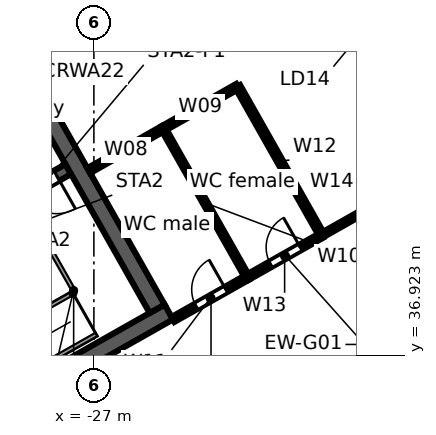
"""IFC4 building model, lengths in metres.
Left out: names, types, materials, properties, quantities, classifications, styles, units other than length and angle.
Written with IfcOpenShell. Run it as: python <this file> out.ifc"""

import sys

from ifc_helpers import new_model, si_unit, direction, frame, frame_2d, origin, place, context, subcontext, project, spatial, rectangle, extrude, element, fill, save


model = new_model("IFC4")
c1 = context("Model", 3, precision=1e-05, world=origin(), true_north=direction((0.0, 1.0)))
c2 = subcontext(c1, "Body", "Model", "MODEL_VIEW")
j1 = project(units=[si_unit("LENGTHUNIT", "METRE"), si_unit("PLANEANGLEUNIT", "RADIAN")], contexts=[c1])
p1 = place(None, origin())
s1 = spatial("IfcSite", under=j1, at=p1, CompositionType="ELEMENT")
p2 = place(p1, origin())
s2 = spatial("IfcBuilding", under=s1, at=p2, CompositionType="ELEMENT")
p3 = place(p2, frame((0.0, 0.0, 238.7)))
s3 = spatial("IfcBuildingStorey", under=s2, at=p3, CompositionType="ELEMENT", Elevation=238.7)
p4 = place(p3, frame((-0.046, 47.974, 0.0), z_axis=(0.0, 0.0, 1.0), x_axis=(-0.870356579543, -0.492421998337, 0.0)))
e1 = element("IfcWall", 1, at=p4, inside=s3, PredefinedType="STANDARD", context=c2, shape_type="SweptSolid", body=[
    extrude(rectangle(XDim=43.754, YDim=0.25, at=frame_2d((21.877, 0.0))), origin(), (0.0, 0.0, 1.0), 3.62),
])
p5 = place(p4, frame((41.061, 0.0, 0.8)))
e2 = element("IfcOpeningElement", 2, at=p5, cuts=e1, PredefinedType="OPENING", context=c2, shape_type="SweptSolid", body=[
    extrude(rectangle(XDim=2.4, YDim=2.2, at=frame_2d((1.2, 1.1))), frame((0.0, 0.135, 0.0), z_axis=(0.0, -1.0, 0.0), x_axis=(1.0, 0.0, 0.0)), (0.0, 0.0, 1.0), 0.27),
])
p6 = place(p4, frame((38.443, 0.0, 0.0)))
e3 = element("IfcOpeningElement", 3, at=p6, cuts=e1, PredefinedType="OPENING", context=c2, shape_type="SweptSolid", body=[
    extrude(rectangle(XDim=1.8, YDim=2.4, at=frame_2d((0.9, 1.2))), frame((0.0, 0.135, 0.0), z_axis=(0.0, -1.0, 0.0), x_axis=(1.0, 0.0, 0.0)), (0.0, 0.0, 1.0), 0.27),
])
p7 = place(p4, frame((35.225, 0.0, 0.8)))
e4 = element("IfcOpeningElement", 4, at=p7, cuts=e1, PredefinedType="OPENING", context=c2, shape_type="SweptSolid", body=[
    extrude(rectangle(XDim=2.4, YDim=2.2, at=frame_2d((1.2, 1.1))), frame((0.0, 0.135, 0.0), z_axis=(0.0, -1.0, 0.0), x_axis=(1.0, 0.0, 0.0)), (0.0, 0.0, 1.0), 0.27),
])
p8 = place(p4, frame((32.307, 0.0, 0.8)))
e5 = element("IfcOpeningElement", 5, at=p8, cuts=e1, PredefinedType="OPENING", context=c2, shape_type="SweptSolid", body=[
    extrude(rectangle(XDim=2.4, YDim=2.2, at=frame_2d((1.2, 1.1))), frame((0.0, 0.135, 0.0), z_axis=(0.0, -1.0, 0.0), x_axis=(1.0, 0.0, 0.0)), (0.0, 0.0, 1.0), 0.27),
])
p9 = place(p4, frame((29.688, 0.0, 0.0)))
e6 = element("IfcOpeningElement", 6, at=p9, cuts=e1, PredefinedType="OPENING", context=c2, shape_type="SweptSolid", body=[
    extrude(rectangle(XDim=1.8, YDim=2.4, at=frame_2d((0.9, 1.2))), frame((0.0, 0.135, 0.0), z_axis=(0.0, -1.0, 0.0), x_axis=(1.0, 0.0, 0.0)), (0.0, 0.0, 1.0), 0.27),
])
p10 = place(p4, frame((26.47, 0.0, 0.8)))
e7 = element("IfcOpeningElement", 7, at=p10, cuts=e1, PredefinedType="OPENING", context=c2, shape_type="SweptSolid", body=[
    extrude(rectangle(XDim=2.4, YDim=2.2, at=frame_2d((1.2, 1.1))), frame((0.0, 0.135, 0.0), z_axis=(0.0, -1.0, 0.0), x_axis=(1.0, 0.0, 0.0)), (0.0, 0.0, 1.0), 0.27),
])
p11 = place(p4, frame((23.552, 0.0, 0.8)))
e8 = element("IfcOpeningElement", 8, at=p11, cuts=e1, PredefinedType="OPENING", context=c2, shape_type="SweptSolid", body=[
    extrude(rectangle(XDim=2.4, YDim=2.2, at=frame_2d((1.2, 1.1))), frame((0.0, 0.135, 0.0), z_axis=(0.0, -1.0, 0.0), x_axis=(1.0, 0.0, 0.0)), (0.0, 0.0, 1.0), 0.27),
])
p12 = place(p4, frame((20.934, 0.0, 0.0)))
e9 = element("IfcOpeningElement", 9, at=p12, cuts=e1, PredefinedType="OPENING", context=c2, shape_type="SweptSolid", body=[
    extrude(rectangle(XDim=1.8, YDim=2.4, at=frame_2d((0.9, 1.2))), frame((0.0, 0.135, 0.0), z_axis=(0.0, -1.0, 0.0), x_axis=(1.0, 0.0, 0.0)), (0.0, 0.0, 1.0), 0.27),
])
p13 = place(p4, frame((17.716, 0.0, 0.8)))
e10 = element("IfcOpeningElement", 10, at=p13, cuts=e1, PredefinedType="OPENING", context=c2, shape_type="SweptSolid", body=[
    extrude(rectangle(XDim=2.4, YDim=2.2, at=frame_2d((1.2, 1.1))), frame((0.0, 0.135, 0.0), z_axis=(0.0, -1.0, 0.0), x_axis=(1.0, 0.0, 0.0)), (0.0, 0.0, 1.0), 0.27),
])
p14 = place(p4, frame((14.798, 0.0, 0.8)))
e11 = element("IfcOpeningElement", 11, at=p14, cuts=e1, PredefinedType="OPENING", context=c2, shape_type="SweptSolid", body=[
    extrude(rectangle(XDim=2.4, YDim=2.2, at=frame_2d((1.2, 1.1))), frame((0.0, 0.135, 0.0), z_axis=(0.0, -1.0, 0.0), x_axis=(1.0, 0.0, 0.0)), (0.0, 0.0, 1.0), 0.27),
])
p15 = place(p4, frame((12.179, 0.0, 0.0)))
e12 = element("IfcOpeningElement", 12, at=p15, cuts=e1, PredefinedType="OPENING", context=c2, shape_type="SweptSolid", body=[
    extrude(rectangle(XDim=1.8, YDim=2.4, at=frame_2d((0.9, 1.2))), frame((0.0, 0.135, 0.0), z_axis=(0.0, -1.0, 0.0), x_axis=(1.0, 0.0, 0.0)), (0.0, 0.0, 1.0), 0.27),
])
p16 = place(p4, frame((8.961, 0.0, 0.8)))
e13 = element("IfcOpeningElement", 13, at=p16, cuts=e1, PredefinedType="OPENING", context=c2, shape_type="SweptSolid", body=[
    extrude(rectangle(XDim=2.4, YDim=2.2, at=frame_2d((1.2, 1.1))), frame((0.0, 0.135, 0.0), z_axis=(0.0, -1.0, 0.0), x_axis=(1.0, 0.0, 0.0)), (0.0, 0.0, 1.0), 0.27),
])
p17 = place(p4, frame((6.043, 0.0, 0.8)))
e14 = element("IfcOpeningElement", 14, at=p17, cuts=e1, PredefinedType="OPENING", context=c2, shape_type="SweptSolid", body=[
    extrude(rectangle(XDim=2.4, YDim=2.2, at=frame_2d((1.2, 1.1))), frame((0.0, 0.135, 0.0), z_axis=(0.0, -1.0, 0.0), x_axis=(1.0, 0.0, 0.0)), (0.0, 0.0, 1.0), 0.27),
])
p18 = place(p4, frame((3.425, 0.0, 0.0)))
e15 = element("IfcOpeningElement", 15, at=p18, cuts=e1, PredefinedType="OPENING", context=c2, shape_type="SweptSolid", body=[
    extrude(rectangle(XDim=1.8, YDim=2.4, at=frame_2d((0.9, 1.2))), frame((0.0, 0.135, 0.0), z_axis=(0.0, -1.0, 0.0), x_axis=(1.0, 0.0, 0.0)), (0.0, 0.0, 1.0), 0.27),
])
p19 = place(p4, frame((0.207, 0.0, 0.8)))
e16 = element("IfcOpeningElement", 16, at=p19, cuts=e1, PredefinedType="OPENING", context=c2, shape_type="SweptSolid", body=[
    extrude(rectangle(XDim=2.4, YDim=2.2, at=frame_2d((1.2, 1.1))), frame((0.0, 0.135, 0.0), z_axis=(0.0, -1.0, 0.0), x_axis=(1.0, 0.0, 0.0)), (0.0, 0.0, 1.0), 0.27),
])
p20 = place(p3, frame((-58.732, 38.771, 0.0), z_axis=(0.0, 0.0, 1.0), x_axis=(0.870354824205, 0.492425100887, 0.0)))
e17 = element("IfcWall", 17, at=p20, inside=s3, PredefinedType="STANDARD", context=c2, shape_type="SweptSolid", body=[
    extrude(rectangle(XDim=64.006, YDim=0.25, at=frame_2d((32.003, 0.0))), origin(), (0.0, 0.0, 1.0), 3.62),
])
p21 = place(p20, frame((61.259, 0.0, 0.8)))
e18 = element("IfcOpeningElement", 18, at=p21, cuts=e17, PredefinedType="OPENING", context=c2, shape_type="SweptSolid", body=[
    extrude(rectangle(XDim=2.4, YDim=2.2, at=frame_2d((1.2, 1.1))), frame((0.0, 0.135, 0.0), z_axis=(0.0, -1.0, 0.0), x_axis=(1.0, 0.0, 0.0)), (0.0, 0.0, 1.0), 0.27),
])
p22 = place(p20, frame((58.216, 0.0, 0.8)))
e19 = element("IfcOpeningElement", 19, at=p22, cuts=e17, PredefinedType="OPENING", context=c2, shape_type="SweptSolid", body=[
    extrude(rectangle(XDim=2.4, YDim=2.2, at=frame_2d((1.2, 1.1))), frame((0.0, 0.135, 0.0), z_axis=(0.0, -1.0, 0.0), x_axis=(1.0, 0.0, 0.0)), (0.0, 0.0, 1.0), 0.27),
])
p23 = place(p20, frame((55.173, 0.0, 0.8)))
e20 = element("IfcOpeningElement", 20, at=p23, cuts=e17, PredefinedType="OPENING", context=c2, shape_type="SweptSolid", body=[
    extrude(rectangle(XDim=2.4, YDim=2.2, at=frame_2d((1.2, 1.1))), frame((0.0, 0.135, 0.0), z_axis=(0.0, -1.0, 0.0), x_axis=(1.0, 0.0, 0.0)), (0.0, 0.0, 1.0), 0.27),
])
p24 = place(p20, frame((52.129, 0.0, 0.8)))
e21 = element("IfcOpeningElement", 21, at=p24, cuts=e17, PredefinedType="OPENING", context=c2, shape_type="SweptSolid", body=[
    extrude(rectangle(XDim=2.4, YDim=2.2, at=frame_2d((1.2, 1.1))), frame((0.0, 0.135, 0.0), z_axis=(0.0, -1.0, 0.0), x_axis=(1.0, 0.0, 0.0)), (0.0, 0.0, 1.0), 0.27),
])
p25 = place(p20, frame((49.086, 0.0, 0.8)))
e22 = element("IfcOpeningElement", 22, at=p25, cuts=e17, PredefinedType="OPENING", context=c2, shape_type="SweptSolid", body=[
    extrude(rectangle(XDim=2.4, YDim=2.2, at=frame_2d((1.2, 1.1))), frame((0.0, 0.135, 0.0), z_axis=(0.0, -1.0, 0.0), x_axis=(1.0, 0.0, 0.0)), (0.0, 0.0, 1.0), 0.27),
])
p26 = place(p20, frame((46.043, 0.0, 0.8)))
e23 = element("IfcOpeningElement", 23, at=p26, cuts=e17, PredefinedType="OPENING", context=c2, shape_type="SweptSolid", body=[
    extrude(rectangle(XDim=2.4, YDim=2.2, at=frame_2d((1.2, 1.1))), frame((0.0, 0.135, 0.0), z_axis=(0.0, -1.0, 0.0), x_axis=(1.0, 0.0, 0.0)), (0.0, 0.0, 1.0), 0.27),
])
p27 = place(p20, frame((43.0, 0.0, 0.8)))
e24 = element("IfcOpeningElement", 24, at=p27, cuts=e17, PredefinedType="OPENING", context=c2, shape_type="SweptSolid", body=[
    extrude(rectangle(XDim=2.4, YDim=2.2, at=frame_2d((1.2, 1.1))), frame((0.0, 0.135, 0.0), z_axis=(0.0, -1.0, 0.0), x_axis=(1.0, 0.0, 0.0)), (0.0, 0.0, 1.0), 0.27),
])
p28 = place(p20, frame((39.956, 0.0, 0.8)))
e25 = element("IfcOpeningElement", 25, at=p28, cuts=e17, PredefinedType="OPENING", context=c2, shape_type="SweptSolid", body=[
    extrude(rectangle(XDim=2.4, YDim=2.2, at=frame_2d((1.2, 1.1))), frame((0.0, 0.135, 0.0), z_axis=(0.0, -1.0, 0.0), x_axis=(1.0, 0.0, 0.0)), (0.0, 0.0, 1.0), 0.27),
])
p29 = place(p20, frame((36.913, 0.0, 0.8)))
e26 = element("IfcOpeningElement", 26, at=p29, cuts=e17, PredefinedType="OPENING", context=c2, shape_type="SweptSolid", body=[
    extrude(rectangle(XDim=2.4, YDim=2.2, at=frame_2d((1.2, 1.1))), frame((0.0, 0.135, 0.0), z_axis=(0.0, -1.0, 0.0), x_axis=(1.0, 0.0, 0.0)), (0.0, 0.0, 1.0), 0.27),
])
p30 = place(p20, frame((33.87, 0.0, 0.8)))
e27 = element("IfcOpeningElement", 27, at=p30, cuts=e17, PredefinedType="OPENING", context=c2, shape_type="SweptSolid", body=[
    extrude(rectangle(XDim=2.4, YDim=2.2, at=frame_2d((1.2, 1.1))), frame((0.0, 0.135, 0.0), z_axis=(0.0, -1.0, 0.0), x_axis=(1.0, 0.0, 0.0)), (0.0, 0.0, 1.0), 0.27),
])
p31 = place(p20, frame((30.826, 0.0, 0.8)))
e28 = element("IfcOpeningElement", 28, at=p31, cuts=e17, PredefinedType="OPENING", context=c2, shape_type="SweptSolid", body=[
    extrude(rectangle(XDim=2.4, YDim=2.2, at=frame_2d((1.2, 1.1))), frame((0.0, 0.135, 0.0), z_axis=(0.0, -1.0, 0.0), x_axis=(1.0, 0.0, 0.0)), (0.0, 0.0, 1.0), 0.27),
])
p32 = place(p20, frame((27.783, 0.0, 0.8)))
e29 = element("IfcOpeningElement", 29, at=p32, cuts=e17, PredefinedType="OPENING", context=c2, shape_type="SweptSolid", body=[
    extrude(rectangle(XDim=2.4, YDim=2.2, at=frame_2d((1.2, 1.1))), frame((0.0, 0.135, 0.0), z_axis=(0.0, -1.0, 0.0), x_axis=(1.0, 0.0, 0.0)), (0.0, 0.0, 1.0), 0.27),
])
p33 = place(p20, frame((24.74, 0.0, 0.8)))
e30 = element("IfcOpeningElement", 30, at=p33, cuts=e17, PredefinedType="OPENING", context=c2, shape_type="SweptSolid", body=[
    extrude(rectangle(XDim=2.4, YDim=2.2, at=frame_2d((1.2, 1.1))), frame((0.0, 0.135, 0.0), z_axis=(0.0, -1.0, 0.0), x_axis=(1.0, 0.0, 0.0)), (0.0, 0.0, 1.0), 0.27),
])
p34 = place(p20, frame((21.696, 0.0, 0.8)))
e31 = element("IfcOpeningElement", 31, at=p34, cuts=e17, PredefinedType="OPENING", context=c2, shape_type="SweptSolid", body=[
    extrude(rectangle(XDim=2.4, YDim=2.2, at=frame_2d((1.2, 1.1))), frame((0.0, 0.135, 0.0), z_axis=(0.0, -1.0, 0.0), x_axis=(1.0, 0.0, 0.0)), (0.0, 0.0, 1.0), 0.27),
])
p35 = place(p20, frame((18.653, 0.0, 0.8)))
e32 = element("IfcOpeningElement", 32, at=p35, cuts=e17, PredefinedType="OPENING", context=c2, shape_type="SweptSolid", body=[
    extrude(rectangle(XDim=2.4, YDim=2.2, at=frame_2d((1.2, 1.1))), frame((0.0, 0.135, 0.0), z_axis=(0.0, -1.0, 0.0), x_axis=(1.0, 0.0, 0.0)), (0.0, 0.0, 1.0), 0.27),
])
p36 = place(p20, frame((15.61, 0.0, 0.8)))
e33 = element("IfcOpeningElement", 33, at=p36, cuts=e17, PredefinedType="OPENING", context=c2, shape_type="SweptSolid", body=[
    extrude(rectangle(XDim=2.4, YDim=2.2, at=frame_2d((1.2, 1.1))), frame((0.0, 0.135, 0.0), z_axis=(0.0, -1.0, 0.0), x_axis=(1.0, 0.0, 0.0)), (0.0, 0.0, 1.0), 0.27),
])
p37 = place(p20, frame((12.567, 0.0, 0.8)))
e34 = element("IfcOpeningElement", 34, at=p37, cuts=e17, PredefinedType="OPENING", context=c2, shape_type="SweptSolid", body=[
    extrude(rectangle(XDim=2.4, YDim=2.2, at=frame_2d((1.2, 1.1))), frame((0.0, 0.135, 0.0), z_axis=(0.0, -1.0, 0.0), x_axis=(1.0, 0.0, 0.0)), (0.0, 0.0, 1.0), 0.27),
])
p38 = place(p20, frame((9.523, 0.0, 0.8)))
e35 = element("IfcOpeningElement", 35, at=p38, cuts=e17, PredefinedType="OPENING", context=c2, shape_type="SweptSolid", body=[
    extrude(rectangle(XDim=2.4, YDim=2.2, at=frame_2d((1.2, 1.1))), frame((0.0, 0.135, 0.0), z_axis=(0.0, -1.0, 0.0), x_axis=(1.0, 0.0, 0.0)), (0.0, 0.0, 1.0), 0.27),
])
p39 = place(p20, frame((6.48, 0.0, 0.8)))
e36 = element("IfcOpeningElement", 36, at=p39, cuts=e17, PredefinedType="OPENING", context=c2, shape_type="SweptSolid", body=[
    extrude(rectangle(XDim=2.4, YDim=2.2, at=frame_2d((1.2, 1.1))), frame((0.0, 0.135, 0.0), z_axis=(0.0, -1.0, 0.0), x_axis=(1.0, 0.0, 0.0)), (0.0, 0.0, 1.0), 0.27),
])
p40 = place(p20, frame((3.437, 0.0, 0.8)))
e37 = element("IfcOpeningElement", 37, at=p40, cuts=e17, PredefinedType="OPENING", context=c2, shape_type="SweptSolid", body=[
    extrude(rectangle(XDim=2.4, YDim=2.2, at=frame_2d((1.2, 1.1))), frame((0.0, 0.135, 0.0), z_axis=(0.0, -1.0, 0.0), x_axis=(1.0, 0.0, 0.0)), (0.0, 0.0, 1.0), 0.27),
])
p41 = place(p20, frame((0.393, 0.0, 0.8)))
e38 = element("IfcOpeningElement", 38, at=p41, cuts=e17, PredefinedType="OPENING", context=c2, shape_type="SweptSolid", body=[
    extrude(rectangle(XDim=2.4, YDim=2.2, at=frame_2d((1.2, 1.1))), frame((0.0, 0.135, 0.0), z_axis=(0.0, -1.0, 0.0), x_axis=(1.0, 0.0, 0.0)), (0.0, 0.0, 1.0), 0.27),
])
p42 = place(p3, frame((-39.825, 29.684, 0.0), z_axis=(0.0, 0.0, 1.0), x_axis=(0.870353598469, 0.492427267353, 0.0)))
e39 = element("IfcWall", 39, at=p42, inside=s3, PredefinedType="SOLIDWALL", context=c2, shape_type="SweptSolid", body=[
    extrude(rectangle(XDim=17.0, YDim=0.45, at=frame_2d((8.5, 0.0))), origin(), (0.0, 0.0, 1.0), 3.62),
])
p43 = place(p42, frame((7.2, 0.0, 0.0)))
e40 = element("IfcOpeningElement", 40, at=p43, cuts=e39, PredefinedType="OPENING", context=c2, shape_type="SweptSolid", body=[
    extrude(rectangle(XDim=1.2, YDim=2.1, at=frame_2d((0.6, 1.05))), frame((0.0, 0.235, 0.0), z_axis=(0.0, -1.0, 0.0), x_axis=(1.0, 0.0, 0.0)), (0.0, 0.0, 1.0), 0.47),
])
p44 = place(p3, frame((-34.245, 38.097, 0.0), z_axis=(0.0, 0.0, 1.0), x_axis=(0.870360409231, 0.492415229297, 0.0)))
e41 = element("IfcWall", 41, at=p44, inside=s3, PredefinedType="SOLIDWALL", context=c2, shape_type="SweptSolid", body=[
    extrude(rectangle(XDim=7.55, YDim=0.3, at=frame_2d((3.775, 0.0))), origin(), (0.0, 0.0, 1.0), 3.62),
])
p45 = place(p44, frame((6.2, 0.0, 0.0)))
e42 = element("IfcOpeningElement", 42, at=p45, cuts=e41, PredefinedType="OPENING", context=c2, shape_type="SweptSolid", body=[
    extrude(rectangle(XDim=1.0, YDim=2.1, at=frame_2d((0.5, 1.05))), frame((0.0, 0.16, 0.0), z_axis=(0.0, -1.0, 0.0), x_axis=(1.0, 0.0, 0.0)), (0.0, 0.0, 1.0), 0.32),
])
p46 = place(p3, frame((-31.787, 49.542, 0.0), z_axis=(0.0, 0.0, 1.0), x_axis=(0.492421378713, -0.870356930107, 0.0)))
e43 = element("IfcWall", 43, at=p46, inside=s3, PredefinedType="SOLIDWALL", context=c2, shape_type="SweptSolid", body=[
    extrude(rectangle(XDim=13.1, YDim=0.45, at=frame_2d((6.55, 0.0))), origin(), (0.0, 0.0, 1.0), 3.62),
])
p47 = place(p3, frame((-24.353, 53.747, 0.0), z_axis=(0.0, 0.0, 1.0), x_axis=(0.492435496286, -0.870348942665, 0.0)))
e44 = element("IfcWall", 44, at=p47, inside=s3, PredefinedType="SOLIDWALL", context=c2, shape_type="SweptSolid", body=[
    extrude(rectangle(XDim=13.1, YDim=0.45, at=frame_2d((6.55, 0.0))), origin(), (0.0, 0.0, 1.0), 3.62),
])
p48 = place(p3, frame((-27.134, 41.776, 0.0), z_axis=(0.0, 0.0, 1.0), x_axis=(0.870285818058, 0.4925470484, 0.0)))
e45 = element("IfcWall", 45, at=p48, inside=s3, PredefinedType="PARTITIONING", context=c2, shape_type="SweptSolid", body=[
    extrude(rectangle(XDim=2.25, YDim=0.15, at=frame_2d((1.125, 0.0))), origin(), (0.0, 0.0, 1.0), 2.892),
])
p49 = place(p3, frame((-25.176, 42.884, 0.0), z_axis=(0.0, 0.0, 1.0), x_axis=(0.870332332106, 0.492464853254, 0.0)))
e46 = element("IfcWall", 46, at=p49, inside=s3, PredefinedType="PARTITIONING", context=c2, shape_type="SweptSolid", body=[
    extrude(rectangle(XDim=2.25, YDim=0.15, at=frame_2d((1.125, 0.0))), origin(), (0.0, 0.0, 1.0), 3.62),
])
p50 = place(p3, frame((-25.176, 42.884, 0.0), z_axis=(0.0, 0.0, 1.0), x_axis=(0.492412939134, -0.87036170491, 0.0)))
e47 = element("IfcWall", 47, at=p50, inside=s3, PredefinedType="PARTITIONING", context=c2, shape_type="SweptSolid", body=[
    extrude(rectangle(XDim=4.5, YDim=0.125, at=frame_2d((2.25, 0.0))), origin(), (0.0, 0.0, 1.0), 3.62),
])
p51 = place(p3, frame((-24.919, 37.859, 0.0), z_axis=(0.0, 0.0, 1.0), x_axis=(0.870391061957, 0.492361045641, 0.0)))
e48 = element("IfcWall", 48, at=p51, inside=s3, PredefinedType="PARTITIONING", context=c2, shape_type="SweptSolid", body=[
    extrude(rectangle(XDim=2.251, YDim=0.15, at=frame_2d((1.125, 0.0))), origin(), (0.0, 0.0, 1.0), 2.892),
])
p52 = place(p51, frame((0.7, 0.0, 0.0)))
e49 = element("IfcOpeningElement", 49, at=p52, cuts=e48, PredefinedType="OPENING", context=c2, shape_type="SweptSolid", body=[
    extrude(rectangle(XDim=0.9, YDim=2.1, at=frame_2d((0.45, 1.05))), frame((0.0, 0.085, 0.0), z_axis=(0.0, -1.0, 0.0), x_axis=(1.0, 0.0, 0.0)), (0.0, 0.0, 1.0), 0.17),
])
p53 = place(p3, frame((-23.218, 43.992, 0.0), z_axis=(0.0, 0.0, 1.0), x_axis=(0.492412939134, -0.87036170491, 0.0)))
e50 = element("IfcWall", 50, at=p53, inside=s3, PredefinedType="PARTITIONING", context=c2, shape_type="SweptSolid", body=[
    extrude(rectangle(XDim=4.5, YDim=0.15, at=frame_2d((2.25, 0.0))), origin(), (0.0, 0.0, 1.0), 3.62),
])
p54 = place(p3, frame((-22.96, 38.967, 0.0), z_axis=(0.0, 0.0, 1.0), x_axis=(0.870332332106, 0.492464853254, 0.0)))
e51 = element("IfcWall", 51, at=p54, inside=s3, PredefinedType="PARTITIONING", context=c2, shape_type="SweptSolid", body=[
    extrude(rectangle(XDim=2.25, YDim=0.15, at=frame_2d((1.125, 0.0))), origin(), (0.0, 0.0, 1.0), 3.62),
])
p55 = place(p54, frame((0.7, 0.0, 0.0)))
e52 = element("IfcOpeningElement", 52, at=p55, cuts=e51, PredefinedType="OPENING", context=c2, shape_type="SweptSolid", body=[
    extrude(rectangle(XDim=0.9, YDim=2.1, at=frame_2d((0.45, 1.05))), frame((0.0, 0.085, 0.0), z_axis=(0.0, -1.0, 0.0), x_axis=(1.0, 0.0, 0.0)), (0.0, 0.0, 1.0), 0.17),
])
p56 = place(p3, frame((-21.002, 40.075, 0.0), z_axis=(0.0, 0.0, 1.0), x_axis=(0.870352535776, 0.492429145632, 0.0)))
e53 = element("IfcWall", 53, at=p56, inside=s3, PredefinedType="PARTITIONING", context=c2, shape_type="SweptSolid", body=[
    extrude(rectangle(XDim=3.591, YDim=0.125, at=frame_2d((1.795, 0.0))), origin(), (0.0, 0.0, 1.0), 3.62),
])
p57 = place(p56, frame((1.45, 0.0, 0.0)))
e54 = element("IfcOpeningElement", 54, at=p57, cuts=e53, PredefinedType="OPENING", context=c2, shape_type="SweptSolid", body=[
    extrude(rectangle(XDim=0.9, YDim=2.1, at=frame_2d((0.45, 1.05))), frame((0.0, 0.073, 0.0), z_axis=(0.0, -1.0, 0.0), x_axis=(1.0, 0.0, 0.0)), (0.0, 0.0, 1.0), 0.145),
])
p58 = place(p45, frame((1.0, 0.0, 0.0), z_axis=(0.0, 0.0, 1.0), x_axis=(-1.0, 0.0, 0.0)))
e55 = element("IfcDoor", 55, at=p58, inside=s3, OperationType="SINGLE_SWING_LEFT", PredefinedType="DOOR", context=c2, shape_type="SweptSolid", body=[
    extrude(rectangle(XDim=1.0, YDim=2.1, at=frame_2d((0.5, 1.05))), frame((0.0, 0.025, 0.0), z_axis=(0.0, -1.0, 0.0), x_axis=(1.0, 0.0, 0.0)), (0.0, 0.0, 1.0), 0.05),
])
fill(e42, e55)
p59 = place(p52, origin())
e56 = element("IfcDoor", 56, at=p59, inside=s3, OperationType="SINGLE_SWING_RIGHT", PredefinedType="DOOR", context=c2, shape_type="SweptSolid", body=[
    extrude(rectangle(XDim=0.9, YDim=2.1, at=frame_2d((0.45, 1.05))), frame((0.0, 0.025, 0.0), z_axis=(0.0, -1.0, 0.0), x_axis=(1.0, 0.0, 0.0)), (0.0, 0.0, 1.0), 0.05),
])
fill(e49, e56)
p60 = place(p55, origin())
e57 = element("IfcDoor", 57, at=p60, inside=s3, OperationType="SINGLE_SWING_RIGHT", PredefinedType="DOOR", context=c2, shape_type="SweptSolid", body=[
    extrude(rectangle(XDim=0.9, YDim=2.1, at=frame_2d((0.45, 1.05))), frame((0.0, 0.025, 0.0), z_axis=(0.0, -1.0, 0.0), x_axis=(1.0, 0.0, 0.0)), (0.0, 0.0, 1.0), 0.05),
])
fill(e52, e57)
save(model, sys.argv[1])
